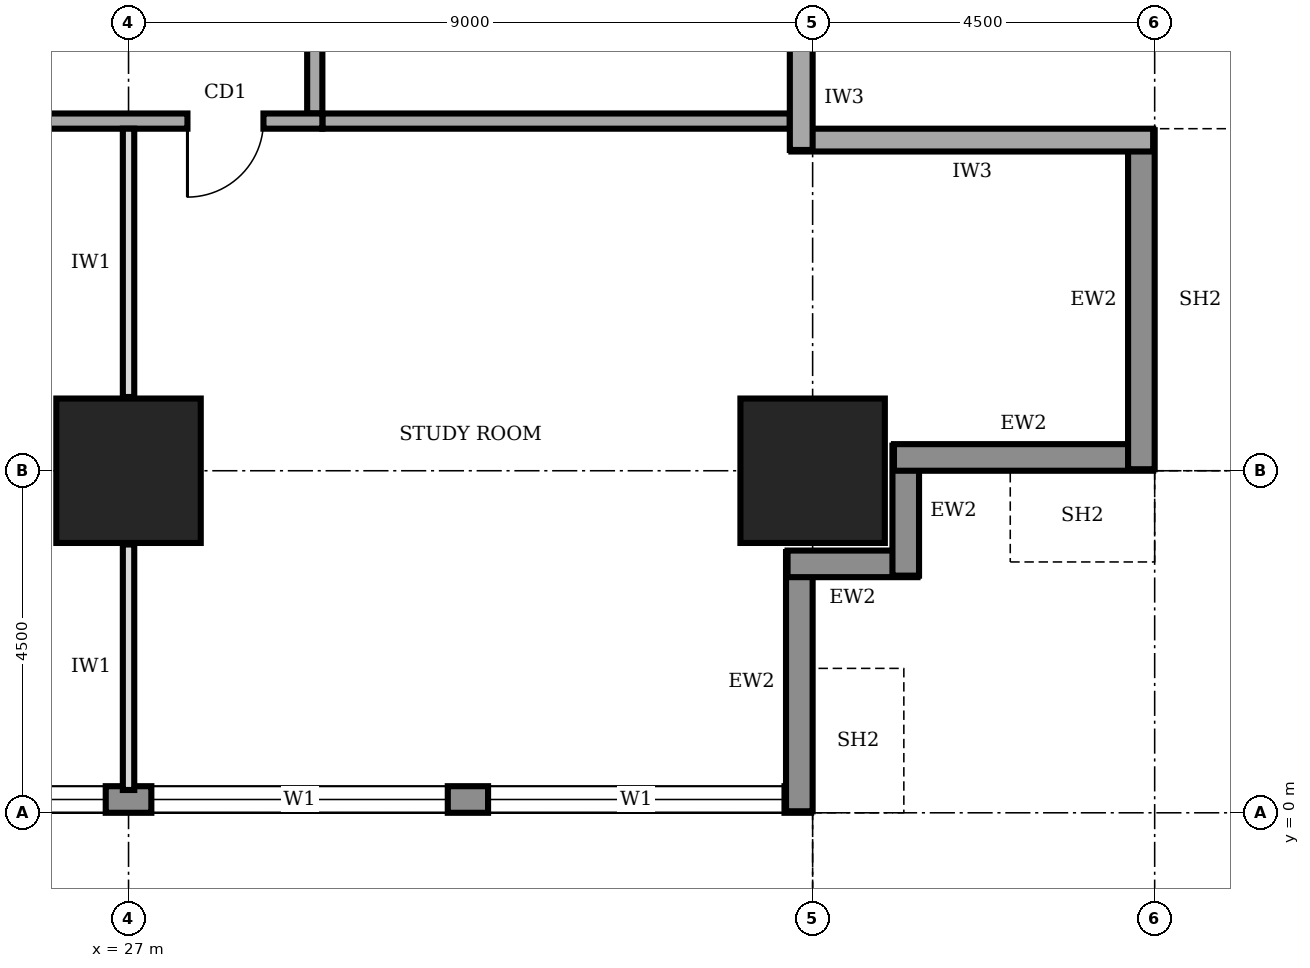
"""IFC4 building model, lengths in metres.
Left out: names, types, materials, properties, quantities, classifications, styles, units other than length and angle.
Written with IfcOpenShell. Run it as: python <this file> out.ifc"""

import sys

from ifc_helpers import new_model, si_unit, direction, frame, frame_2d, origin, origin_2d, place, context, subcontext, project, spatial, rectangle, extrude, element, fill, save


model = new_model("IFC4")
c1 = context("Model", 3, precision=1e-05, world=origin(), true_north=direction((0.0, 1.0)))
c2 = subcontext(c1, "Body", "Model", "MODEL_VIEW")
j1 = project(units=[si_unit("LENGTHUNIT", "METRE"), si_unit("PLANEANGLEUNIT", "RADIAN")], contexts=[c1])
p1 = place(None, origin())
s1 = spatial("IfcSite", under=j1, at=p1, CompositionType="ELEMENT")
p2 = place(p1, origin())
s2 = spatial("IfcBuilding", under=s1, at=p2, CompositionType="ELEMENT")
p3 = place(p2, frame((0.0, 0.0, 121.0)))
s3 = spatial("IfcBuildingStorey", under=s2, at=p3, CompositionType="ELEMENT", Elevation=121.0)
for number, where, z_axis, x_axis in (
    (1, (27.0, 4.5, 0.0), (0.0, 0.0, 1.0), (1.0, 0.0, 0.0)),
    (2, (36.0, 4.5, 0.0), (0.0, 0.0, 1.0), (1.0, 0.0, 0.0)),
):
    element("IfcColumn", number, at=place(p3, frame(where, z_axis=z_axis, x_axis=x_axis)), inside=s3, PredefinedType="COLUMN", context=c2, shape_type="SweptSolid", body=[
        extrude(rectangle(XDim=1.9, YDim=1.9, at=origin_2d()), origin(), (0.0, 0.0, 1.0), 4.0),
    ])
p4 = place(p3, frame((4.52, 0.175, 0.0), z_axis=(0.0, 0.0, 1.0), x_axis=(1.0, 0.0, 0.0)))
e3 = element("IfcWall", 3, at=p4, inside=s3, PredefinedType="STANDARD", context=c2, shape_type="SweptSolid", body=[
    extrude(rectangle(XDim=31.46, YDim=0.35, at=frame_2d((15.73, 0.0))), origin(), (0.0, 0.0, 1.0), 3.75),
])
p5 = place(p4, frame((4.78, 0.0, 0.9)))
e4 = element("IfcOpeningElement", 4, at=p5, cuts=e3, PredefinedType="OPENING", context=c2, shape_type="SweptSolid", body=[
    extrude(rectangle(XDim=3.9, YDim=2.2, at=frame_2d((1.95, 1.1))), frame((0.0, 0.185, 0.0), z_axis=(0.0, -1.0, 0.0), x_axis=(1.0, 0.0, 0.0)), (0.0, 0.0, 1.0), 0.37),
])
p6 = place(p4, frame((9.28, 0.0, 0.9)))
e5 = element("IfcOpeningElement", 5, at=p6, cuts=e3, PredefinedType="OPENING", context=c2, shape_type="SweptSolid", body=[
    extrude(rectangle(XDim=3.9, YDim=2.2, at=frame_2d((1.95, 1.1))), frame((0.0, 0.185, 0.0), z_axis=(0.0, -1.0, 0.0), x_axis=(1.0, 0.0, 0.0)), (0.0, 0.0, 1.0), 0.37),
])
p7 = place(p4, frame((13.78, 0.0, 0.9)))
e6 = element("IfcOpeningElement", 6, at=p7, cuts=e3, PredefinedType="OPENING", context=c2, shape_type="SweptSolid", body=[
    extrude(rectangle(XDim=3.9, YDim=2.2, at=frame_2d((1.95, 1.1))), frame((0.0, 0.185, 0.0), z_axis=(0.0, -1.0, 0.0), x_axis=(1.0, 0.0, 0.0)), (0.0, 0.0, 1.0), 0.37),
])
p8 = place(p4, frame((18.28, 0.0, 0.9)))
e7 = element("IfcOpeningElement", 7, at=p8, cuts=e3, PredefinedType="OPENING", context=c2, shape_type="SweptSolid", body=[
    extrude(rectangle(XDim=3.9, YDim=2.2, at=frame_2d((1.95, 1.1))), frame((0.0, 0.185, 0.0), z_axis=(0.0, -1.0, 0.0), x_axis=(1.0, 0.0, 0.0)), (0.0, 0.0, 1.0), 0.37),
])
p9 = place(p4, frame((22.78, 0.0, 0.9)))
e8 = element("IfcOpeningElement", 8, at=p9, cuts=e3, PredefinedType="OPENING", context=c2, shape_type="SweptSolid", body=[
    extrude(rectangle(XDim=3.9, YDim=2.2, at=frame_2d((1.95, 1.1))), frame((0.0, 0.185, 0.0), z_axis=(0.0, -1.0, 0.0), x_axis=(1.0, 0.0, 0.0)), (0.0, 0.0, 1.0), 0.37),
])
p10 = place(p4, frame((27.21, 0.0, 0.9)))
e9 = element("IfcOpeningElement", 9, at=p10, cuts=e3, PredefinedType="OPENING", context=c2, shape_type="SweptSolid", body=[
    extrude(rectangle(XDim=3.9, YDim=2.2, at=frame_2d((1.95, 1.1))), frame((0.0, 0.185, 0.0), z_axis=(0.0, -1.0, 0.0), x_axis=(1.0, 0.0, 0.0)), (0.0, 0.0, 1.0), 0.37),
])
p11 = place(p3, frame((35.825, 0.02, 0.0), z_axis=(0.0, 0.0, 1.0), x_axis=(0.0, 1.0, 0.0)))
e10 = element("IfcWall", 10, at=p11, inside=s3, PredefinedType="STANDARD", context=c2, shape_type="SweptSolid", body=[
    extrude(rectangle(XDim=3.41, YDim=0.35, at=frame_2d((1.705, 0.0))), origin(), (0.0, 0.0, 1.0), 2.85),
])
for number, where, z_axis, x_axis in (
    (11, (35.67, 3.275, 0.0), (0.0, 0.0, 1.0), (1.0, 0.0, 0.0)),
    (12, (37.225, 3.12, 0.0), (0.0, 0.0, 1.0), (0.0, 1.0, 0.0)),
):
    element("IfcWall", number, at=place(p3, frame(where, z_axis=z_axis, x_axis=x_axis)), inside=s3, PredefinedType="STANDARD", context=c2, shape_type="SweptSolid", body=[
        extrude(rectangle(XDim=1.71, YDim=0.35, at=frame_2d((0.855, 0.0))), origin(), (0.0, 0.0, 1.0), 3.75),
    ])
p12 = place(p3, frame((37.07, 4.675, 0.0), z_axis=(0.0, 0.0, 1.0), x_axis=(1.0, 0.0, 0.0)))
e13 = element("IfcWall", 13, at=p12, inside=s3, PredefinedType="STANDARD", context=c2, shape_type="SweptSolid", body=[
    extrude(rectangle(XDim=3.41, YDim=0.35, at=frame_2d((1.705, 0.0))), origin(), (0.0, 0.0, 1.0), 2.85),
])
p13 = place(p3, frame((40.325, 4.52, 0.0), z_axis=(0.0, 0.0, 1.0), x_axis=(0.0, 1.0, 0.0)))
e14 = element("IfcWall", 14, at=p13, inside=s3, PredefinedType="STANDARD", context=c2, shape_type="SweptSolid", body=[
    extrude(rectangle(XDim=4.46, YDim=0.35, at=frame_2d((2.23, 0.0))), origin(), (0.0, 0.0, 1.0), 3.75),
])
p14 = place(p3, frame((40.48, 8.85, 0.0), z_axis=(0.0, 0.0, 1.0), x_axis=(-1.0, 0.0, 0.0)))
e15 = element("IfcWall", 15, at=p14, inside=s3, PredefinedType="SOLIDWALL", context=c2, shape_type="SweptSolid", body=[
    extrude(rectangle(XDim=4.76, YDim=0.3, at=frame_2d((2.38, 0.0))), origin(), (0.0, 0.0, 1.0), 3.75),
])
p15 = place(p3, frame((35.85, 8.72, 0.0), z_axis=(0.0, 0.0, 1.0), x_axis=(0.0, 1.0, 0.0)))
e16 = element("IfcWall", 16, at=p15, inside=s3, PredefinedType="SOLIDWALL", context=c2, shape_type="SweptSolid", body=[
    extrude(rectangle(XDim=1.38, YDim=0.3, at=frame_2d((0.69, 0.0))), origin(), (0.0, 0.0, 1.0), 2.65),
])
p16 = place(p3, frame((11.9, 9.1, 0.0), z_axis=(0.0, 0.0, 1.0), x_axis=(1.0, 0.0, 0.0)))
e17 = element("IfcWall", 17, at=p16, inside=s3, PredefinedType="SOLIDWALL", context=c2, shape_type="SweptSolid", body=[
    extrude(rectangle(XDim=17.65, YDim=0.2, at=frame_2d((8.825, 0.0))), origin(), (0.0, 0.0, 1.0), 3.75),
])
p17 = place(p16, frame((2.25, 0.0, 0.0)))
e18 = element("IfcOpeningElement", 18, at=p17, cuts=e17, PredefinedType="OPENING", context=c2, shape_type="SweptSolid", body=[
    extrude(rectangle(XDim=1.4, YDim=2.1, at=frame_2d((0.7, 1.05))), frame((0.0, 0.11, 0.0), z_axis=(0.0, -1.0, 0.0), x_axis=(1.0, 0.0, 0.0)), (0.0, 0.0, 1.0), 0.22),
])
p18 = place(p16, frame((10.1, 0.0, 0.0)))
e19 = element("IfcOpeningElement", 19, at=p18, cuts=e17, PredefinedType="OPENING", context=c2, shape_type="SweptSolid", body=[
    extrude(rectangle(XDim=1.0, YDim=2.1, at=frame_2d((0.5, 1.05))), frame((0.0, 0.11, 0.0), z_axis=(0.0, -1.0, 0.0), x_axis=(1.0, 0.0, 0.0)), (0.0, 0.0, 1.0), 0.22),
])
p19 = place(p16, frame((15.875, 0.0, 0.0)))
e20 = element("IfcOpeningElement", 20, at=p19, cuts=e17, PredefinedType="OPENING", context=c2, shape_type="SweptSolid", body=[
    extrude(rectangle(XDim=1.0, YDim=2.1, at=frame_2d((0.5, 1.05))), frame((0.0, 0.11, 0.0), z_axis=(0.0, -1.0, 0.0), x_axis=(1.0, 0.0, 0.0)), (0.0, 0.0, 1.0), 0.22),
])
p20 = place(p3, frame((29.45, 9.2, 0.0), z_axis=(0.0, 0.0, 1.0), x_axis=(0.0, 1.0, 0.0)))
e21 = element("IfcWall", 21, at=p20, inside=s3, PredefinedType="SOLIDWALL", context=c2, shape_type="SweptSolid", body=[
    extrude(rectangle(XDim=23.05, YDim=0.2, at=frame_2d((11.525, 0.0))), origin(), (0.0, 0.0, 1.0), 3.75),
])
p21 = place(p20, frame((10.525, 0.0, 0.0)))
e22 = element("IfcOpeningElement", 22, at=p21, cuts=e21, PredefinedType="OPENING", context=c2, shape_type="SweptSolid", body=[
    extrude(rectangle(XDim=1.8, YDim=2.1, at=frame_2d((0.9, 1.05))), frame((0.0, 0.11, 0.0), z_axis=(0.0, -1.0, 0.0), x_axis=(1.0, 0.0, 0.0)), (0.0, 0.0, 1.0), 0.22),
])
p22 = place(p3, frame((29.55, 9.1, 0.0), z_axis=(0.0, 0.0, 1.0), x_axis=(1.0, 0.0, 0.0)))
e23 = element("IfcWall", 23, at=p22, inside=s3, PredefinedType="SOLIDWALL", context=c2, shape_type="SweptSolid", body=[
    extrude(rectangle(XDim=6.15, YDim=0.2, at=frame_2d((3.075, 0.0))), origin(), (0.0, 0.0, 1.0), 3.75),
])
p23 = place(p3, frame((27.0, 0.3, 0.0), z_axis=(0.0, 0.0, 1.0), x_axis=(0.0, 1.0, 0.0)))
e24 = element("IfcWall", 24, at=p23, inside=s3, PredefinedType="PARTITIONING", context=c2, shape_type="SweptSolid", body=[
    extrude(rectangle(XDim=3.23, YDim=0.15, at=frame_2d((1.615, 0.0))), origin(), (0.0, 0.0, 1.0), 2.85),
])
p24 = place(p3, frame((27.0, 5.47, 0.0), z_axis=(0.0, 0.0, 1.0), x_axis=(0.0, 1.0, 0.0)))
e25 = element("IfcWall", 25, at=p24, inside=s3, PredefinedType="PARTITIONING", context=c2, shape_type="SweptSolid", body=[
    extrude(rectangle(XDim=3.53, YDim=0.15, at=frame_2d((1.765, 0.0))), origin(), (0.0, 0.0, 1.0), 2.85),
])
p25 = place(p8, origin())
e26 = element("IfcWindow", 26, at=p25, inside=s3, PartitioningType="SINGLE_PANEL", PredefinedType="WINDOW", context=c2, shape_type="SweptSolid", body=[
    extrude(rectangle(XDim=3.9, YDim=2.2, at=frame_2d((1.95, 1.1))), frame((0.0, 0.03, 0.0), z_axis=(0.0, -1.0, 0.0), x_axis=(1.0, 0.0, 0.0)), (0.0, 0.0, 1.0), 0.06),
])
fill(e7, e26)
p26 = place(p9, origin())
e27 = element("IfcWindow", 27, at=p26, inside=s3, PartitioningType="SINGLE_PANEL", PredefinedType="WINDOW", context=c2, shape_type="SweptSolid", body=[
    extrude(rectangle(XDim=3.9, YDim=2.2, at=frame_2d((1.95, 1.1))), frame((0.0, 0.03, 0.0), z_axis=(0.0, -1.0, 0.0), x_axis=(1.0, 0.0, 0.0)), (0.0, 0.0, 1.0), 0.06),
])
fill(e8, e27)
p27 = place(p10, origin())
e28 = element("IfcWindow", 28, at=p27, inside=s3, PartitioningType="SINGLE_PANEL", PredefinedType="WINDOW", context=c2, shape_type="SweptSolid", body=[
    extrude(rectangle(XDim=3.9, YDim=2.2, at=frame_2d((1.95, 1.1))), frame((0.0, 0.03, 0.0), z_axis=(0.0, -1.0, 0.0), x_axis=(1.0, 0.0, 0.0)), (0.0, 0.0, 1.0), 0.06),
])
fill(e9, e28)
p28 = place(p19, frame((1.0, 0.0, 0.0), z_axis=(0.0, 0.0, 1.0), x_axis=(-1.0, 0.0, 0.0)))
e29 = element("IfcDoor", 29, at=p28, inside=s3, OperationType="SINGLE_SWING_RIGHT", PredefinedType="DOOR", context=c2, shape_type="SweptSolid", body=[
    extrude(rectangle(XDim=1.0, YDim=2.1, at=frame_2d((0.5, 1.05))), frame((0.0, 0.025, 0.0), z_axis=(0.0, -1.0, 0.0), x_axis=(1.0, 0.0, 0.0)), (0.0, 0.0, 1.0), 0.05),
])
fill(e20, e29)
save(model, sys.argv[1])
